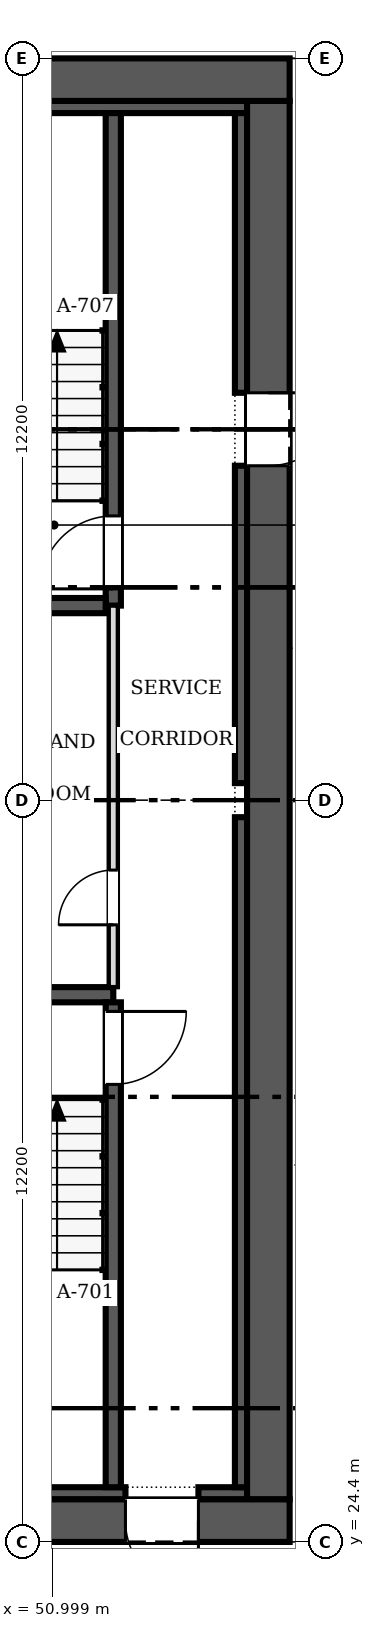
"""IFC4 building model, lengths in metres.
Left out: names, types, materials, properties, quantities, classifications, styles, units other than length and angle.
Written with IfcOpenShell. Run it as: python <this file> out.ifc"""

import sys

from ifc_helpers import new_model, si_unit, direction, frame, frame_2d, origin, place, context, subcontext, project, spatial, rectangle, extrude, source, transform, mapped, element, fill, save


model = new_model("IFC4")
c1 = context("Model", 3, precision=1e-05, world=origin(), true_north=direction((0.0, 1.0)))
c2 = subcontext(c1, "Body", "Model", "MODEL_VIEW")
j1 = project(units=[si_unit("LENGTHUNIT", "METRE"), si_unit("PLANEANGLEUNIT", "RADIAN")], contexts=[c1])
p1 = place(None, origin())
s1 = spatial("IfcSite", under=j1, at=p1, CompositionType="ELEMENT")
p2 = place(p1, origin())
s2 = spatial("IfcBuilding", under=s1, at=p2, CompositionType="ELEMENT")
p3 = place(p2, frame((0.0, 0.0, 135.4)))
s3 = spatial("IfcBuildingStorey", under=s2, at=p3, CompositionType="ELEMENT", Elevation=135.4)
p4 = place(p3, frame((54.9, 24.75, 0.0), z_axis=(0.0, 0.0, 1.0), x_axis=(-1.0, 0.0, 0.0)))
e1 = element("IfcWall", 1, at=p4, inside=s3, PredefinedType="SHEAR", context=c2, shape_type="SweptSolid", body=[
    extrude(rectangle(XDim=24.4, YDim=0.7, at=frame_2d((12.2, 0.0))), origin(), (0.0, 0.0, 1.0), 3.8),
])
m1 = source(origin(), c2, "Body", "SweptSolid", [
    extrude(rectangle(XDim=1.2, YDim=2.1, at=frame_2d((0.6, 1.05))), frame((0.0, 0.36, 0.0), z_axis=(0.0, -1.0, 0.0), x_axis=(1.0, 0.0, 0.0)), (0.0, 0.0, 1.0), 0.72),
])
p5 = place(p4, frame((1.5, 0.0, 0.0)))
e2 = element("IfcOpeningElement", 2, at=p5, cuts=e1, PredefinedType="OPENING", context=c2, shape_type="MappedRepresentation", body=[
    mapped(m1, transform((0.0, 0.0, 0.0), scale=1.0)),
])
p6 = place(p3, frame((30.5, 48.45, 0.0), z_axis=(0.0, 0.0, 1.0), x_axis=(1.0, 0.0, 0.0)))
e3 = element("IfcWall", 3, at=p6, inside=s3, PredefinedType="SHEAR", context=c2, shape_type="SweptSolid", body=[
    extrude(rectangle(XDim=24.4, YDim=0.7, at=frame_2d((12.2, 0.0))), origin(), (0.0, 0.0, 1.0), 3.8),
])
p7 = place(p3, frame((54.55, 48.1, 0.0), z_axis=(0.0, 0.0, 1.0), x_axis=(0.0, -1.0, 0.0)))
e4 = element("IfcWall", 4, at=p7, inside=s3, PredefinedType="SHEAR", context=c2, shape_type="SweptSolid", body=[
    extrude(rectangle(XDim=23.0, YDim=0.7, at=frame_2d((11.5, 0.0))), origin(), (0.0, 0.0, 1.0), 3.8),
])
p8 = place(p7, frame((4.8, 0.0, 0.0)))
e5 = element("IfcOpeningElement", 5, at=p8, cuts=e4, PredefinedType="OPENING", context=c2, shape_type="MappedRepresentation", body=[
    mapped(m1, transform((0.0, 0.0, 0.0), scale=1.0)),
])
p9 = place(p3, frame((31.2, 25.2, 0.0), z_axis=(0.0, 0.0, 1.0), x_axis=(1.0, 0.0, 0.0)))
e6 = element("IfcWall", 6, at=p9, inside=s3, PredefinedType="SOLIDWALL", context=c2, shape_type="SweptSolid", body=[
    extrude(rectangle(XDim=21.0, YDim=0.2, at=frame_2d((10.5, 0.0))), origin(), (0.0, 0.0, 1.0), 3.8),
])
p10 = place(p3, frame((53.4, 25.2, 0.0), z_axis=(0.0, 0.0, 1.0), x_axis=(1.0, 0.0, 0.0)))
e7 = element("IfcWall", 7, at=p10, inside=s3, PredefinedType="SOLIDWALL", context=c2, shape_type="SweptSolid", body=[
    extrude(rectangle(XDim=0.8, YDim=0.2, at=frame_2d((0.4, 0.0))), origin(), (0.0, 0.0, 1.0), 3.8),
])
p11 = place(p3, frame((31.2, 48.0, 0.0), z_axis=(0.0, 0.0, 1.0), x_axis=(1.0, 0.0, 0.0)))
e8 = element("IfcWall", 8, at=p11, inside=s3, PredefinedType="SOLIDWALL", context=c2, shape_type="SweptSolid", body=[
    extrude(rectangle(XDim=23.0, YDim=0.2, at=frame_2d((11.5, 0.0))), origin(), (0.0, 0.0, 1.0), 3.8),
])
p12 = place(p3, frame((54.1, 25.3, 0.0), z_axis=(0.0, 0.0, 1.0), x_axis=(0.0, 1.0, 0.0)))
e9 = element("IfcWall", 9, at=p12, inside=s3, PredefinedType="SOLIDWALL", context=c2, shape_type="SweptSolid", body=[
    extrude(rectangle(XDim=11.02, YDim=0.2, at=frame_2d((5.51, 0.0))), origin(), (0.0, 0.0, 1.0), 3.8),
])
p13 = place(p3, frame((54.1, 36.88, 0.0), z_axis=(0.0, 0.0, 1.0), x_axis=(0.0, 1.0, 0.0)))
e10 = element("IfcWall", 10, at=p13, inside=s3, PredefinedType="SOLIDWALL", context=c2, shape_type="SweptSolid", body=[
    extrude(rectangle(XDim=5.22, YDim=0.2, at=frame_2d((2.61, 0.0))), origin(), (0.0, 0.0, 1.0), 3.8),
])
p14 = place(p3, frame((54.1, 43.3, 0.0), z_axis=(0.0, 0.0, 1.0), x_axis=(0.0, 1.0, 0.0)))
e11 = element("IfcWall", 11, at=p14, inside=s3, PredefinedType="SOLIDWALL", context=c2, shape_type="SweptSolid", body=[
    extrude(rectangle(XDim=4.6, YDim=0.2, at=frame_2d((2.3, 0.0))), origin(), (0.0, 0.0, 1.0), 3.8),
])
p15 = place(p3, frame((48.475, 33.4, 0.0), z_axis=(0.0, 0.0, 1.0), x_axis=(1.0, 0.0, 0.0)))
e12 = element("IfcWall", 12, at=p15, inside=s3, PredefinedType="SOLIDWALL", context=c2, shape_type="SweptSolid", body=[
    extrude(rectangle(XDim=3.525, YDim=0.25, at=frame_2d((1.762, 0.0))), origin(), (0.0, 0.0, 1.0), 3.8),
])
p16 = place(p3, frame((52.0, 25.3, 0.0), z_axis=(0.0, 0.0, 1.0), x_axis=(0.0, 1.0, 0.0)))
e13 = element("IfcWall", 13, at=p16, inside=s3, PredefinedType="SOLIDWALL", context=c2, shape_type="SweptSolid", body=[
    extrude(rectangle(XDim=7.975, YDim=0.25, at=frame_2d((3.987, 0.0))), origin(), (0.0, 0.0, 1.0), 3.8),
])
m2 = source(origin(), c2, "Body", "SweptSolid", [
    extrude(rectangle(XDim=1.2, YDim=2.1, at=frame_2d((0.6, 1.05))), frame((0.0, 0.135, 0.0), z_axis=(0.0, -1.0, 0.0), x_axis=(1.0, 0.0, 0.0)), (0.0, 0.0, 1.0), 0.27),
])
p17 = place(p16, frame((6.625, 0.0, 0.0)))
e14 = element("IfcOpeningElement", 14, at=p17, cuts=e13, PredefinedType="OPENING", context=c2, shape_type="MappedRepresentation", body=[
    mapped(m2, transform((0.0, 0.0, 0.0), scale=1.0)),
])
p18 = place(p3, frame((52.0, 39.8, 0.0), z_axis=(0.0, 0.0, 1.0), x_axis=(0.0, 1.0, 0.0)))
e15 = element("IfcWall", 15, at=p18, inside=s3, PredefinedType="SOLIDWALL", context=c2, shape_type="SweptSolid", body=[
    extrude(rectangle(XDim=8.1, YDim=0.25, at=frame_2d((4.05, 0.0))), origin(), (0.0, 0.0, 1.0), 3.8),
])
p19 = place(p18, frame((0.275, 0.0, 0.0)))
e16 = element("IfcOpeningElement", 16, at=p19, cuts=e15, PredefinedType="OPENING", context=c2, shape_type="MappedRepresentation", body=[
    mapped(m2, transform((0.0, 0.0, 0.0), scale=1.0)),
])
p20 = place(p3, frame((48.475, 39.8, 0.0), z_axis=(0.0, 0.0, 1.0), x_axis=(1.0, 0.0, 0.0)))
e17 = element("IfcWall", 17, at=p20, inside=s3, PredefinedType="SOLIDWALL", context=c2, shape_type="SweptSolid", body=[
    extrude(rectangle(XDim=3.4, YDim=0.25, at=frame_2d((1.7, 0.0))), origin(), (0.0, 0.0, 1.0), 3.8),
])
p21 = place(p3, frame((52.0, 33.525, 0.0), z_axis=(0.0, 0.0, 1.0), x_axis=(0.0, 1.0, 0.0)))
e18 = element("IfcWall", 18, at=p21, inside=s3, PredefinedType="PARTITIONING", context=c2, shape_type="SweptSolid", body=[
    extrude(rectangle(XDim=6.275, YDim=0.15, at=frame_2d((3.138, 0.0))), origin(), (0.0, 0.0, 1.0), 3.6),
])
m3 = source(origin(), c2, "Body", "SweptSolid", [
    extrude(rectangle(XDim=0.9, YDim=2.1, at=frame_2d((0.45, 1.05))), frame((0.0, 0.085, 0.0), z_axis=(0.0, -1.0, 0.0), x_axis=(1.0, 0.0, 0.0)), (0.0, 0.0, 1.0), 0.17),
])
p22 = place(p21, frame((1.025, 0.0, 0.0)))
e19 = element("IfcOpeningElement", 19, at=p22, cuts=e18, PredefinedType="OPENING", context=c2, shape_type="MappedRepresentation", body=[
    mapped(m3, transform((0.0, 0.0, 0.0), scale=1.0)),
])
m4 = source(origin(), c2, "Body", "SweptSolid", [
    extrude(rectangle(XDim=1.2, YDim=2.1, at=frame_2d((0.6, 1.05))), frame((0.0, 0.025, 0.0), z_axis=(0.0, -1.0, 0.0), x_axis=(1.0, 0.0, 0.0)), (0.0, 0.0, 1.0), 0.05),
])
p23 = place(p5, origin())
e20 = element("IfcDoor", 20, at=p23, inside=s3, OperationType="SINGLE_SWING_LEFT", PredefinedType="DOOR", context=c2, shape_type="MappedRepresentation", body=[
    mapped(m4, transform((0.0, 0.0, 0.0), scale=1.0)),
])
fill(e2, e20)
p24 = place(p8, origin())
e21 = element("IfcDoor", 21, at=p24, inside=s3, OperationType="SINGLE_SWING_LEFT", PredefinedType="DOOR", context=c2, shape_type="MappedRepresentation", body=[
    mapped(m4, transform((0.0, 0.0, 0.0), scale=1.0)),
])
fill(e5, e21)
p25 = place(p17, origin())
e22 = element("IfcDoor", 22, at=p25, inside=s3, OperationType="SINGLE_SWING_RIGHT", PredefinedType="DOOR", context=c2, shape_type="MappedRepresentation", body=[
    mapped(m4, transform((0.0, 0.0, 0.0), scale=1.0)),
])
fill(e14, e22)
p26 = place(p19, origin())
e23 = element("IfcDoor", 23, at=p26, inside=s3, OperationType="SINGLE_SWING_LEFT", PredefinedType="DOOR", context=c2, shape_type="MappedRepresentation", body=[
    mapped(m4, transform((0.0, 0.0, 0.0), scale=1.0)),
])
fill(e16, e23)
m5 = source(origin(), c2, "Body", "SweptSolid", [
    extrude(rectangle(XDim=0.9, YDim=2.1, at=frame_2d((0.45, 1.05))), frame((0.0, 0.025, 0.0), z_axis=(0.0, -1.0, 0.0), x_axis=(1.0, 0.0, 0.0)), (0.0, 0.0, 1.0), 0.05),
])
p27 = place(p22, origin())
e24 = element("IfcDoor", 24, at=p27, inside=s3, OperationType="SINGLE_SWING_LEFT", PredefinedType="DOOR", context=c2, shape_type="MappedRepresentation", body=[
    mapped(m5, transform((0.0, 0.0, 0.0), scale=1.0)),
])
fill(e19, e24)
save(model, sys.argv[1])
